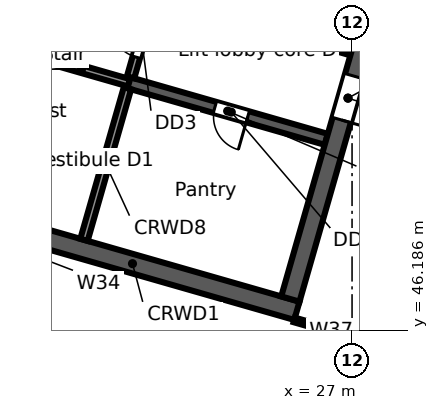
"""IFC4 building model, lengths in metres.
Left out: names, types, materials, properties, quantities, classifications, styles, units other than length and angle.
Written with IfcOpenShell. Run it as: python <this file> out.ifc"""

import sys

from ifc_helpers import new_model, si_unit, direction, frame, frame_2d, origin, place, context, subcontext, project, spatial, rectangle, extrude, element, fill, save


model = new_model("IFC4")
c1 = context("Model", 3, precision=1e-05, world=origin(), true_north=direction((0.0, 1.0)))
c2 = subcontext(c1, "Body", "Model", "MODEL_VIEW")
j1 = project(units=[si_unit("LENGTHUNIT", "METRE"), si_unit("PLANEANGLEUNIT", "RADIAN")], contexts=[c1])
p1 = place(None, origin())
s1 = spatial("IfcSite", under=j1, at=p1, CompositionType="ELEMENT")
p2 = place(p1, origin())
s2 = spatial("IfcBuilding", under=s1, at=p2, CompositionType="ELEMENT")
p3 = place(p2, frame((0.0, 0.0, 162.9)))
s3 = spatial("IfcBuildingStorey", under=s2, at=p3, CompositionType="ELEMENT", Elevation=162.9)
p4 = place(p3, frame((24.042, 41.106, 0.0), z_axis=(0.0, 0.0, 1.0), x_axis=(-0.961261693976, 0.275637362661, 0.0)))
e1 = element("IfcWall", 1, at=p4, inside=s3, PredefinedType="STANDARD", context=c2, shape_type="SweptSolid", body=[
    extrude(rectangle(XDim=24.948, YDim=0.3, at=frame_2d((12.474, 0.0))), origin(), (0.0, 0.0, 1.0), 3.68),
])
p5 = place(p4, frame((21.441, 0.0, 0.6)))
e2 = element("IfcOpeningElement", 2, at=p5, cuts=e1, PredefinedType="OPENING", context=c2, shape_type="SweptSolid", body=[
    extrude(rectangle(XDim=0.9, YDim=2.4, at=frame_2d((0.45, 1.2))), frame((0.0, 0.16, 0.0), z_axis=(0.0, -1.0, 0.0), x_axis=(1.0, 0.0, 0.0)), (0.0, 0.0, 1.0), 0.32),
])
p6 = place(p4, frame((13.121, 0.0, 0.6)))
e3 = element("IfcOpeningElement", 3, at=p6, cuts=e1, PredefinedType="OPENING", context=c2, shape_type="SweptSolid", body=[
    extrude(rectangle(XDim=0.9, YDim=2.4, at=frame_2d((0.45, 1.2))), frame((0.0, 0.16, 0.0), z_axis=(0.0, -1.0, 0.0), x_axis=(1.0, 0.0, 0.0)), (0.0, 0.0, 1.0), 0.32),
])
p7 = place(p4, frame((10.591, 0.0, 0.0)))
e4 = element("IfcOpeningElement", 4, at=p7, cuts=e1, PredefinedType="OPENING", context=c2, shape_type="SweptSolid", body=[
    extrude(rectangle(XDim=1.8, YDim=2.4, at=frame_2d((0.9, 1.2))), frame((0.0, 0.16, 0.0), z_axis=(0.0, -1.0, 0.0), x_axis=(1.0, 0.0, 0.0)), (0.0, 0.0, 1.0), 0.32),
])
p8 = place(p4, frame((4.8, 0.0, 0.6)))
e5 = element("IfcOpeningElement", 5, at=p8, cuts=e1, PredefinedType="OPENING", context=c2, shape_type="SweptSolid", body=[
    extrude(rectangle(XDim=0.9, YDim=2.4, at=frame_2d((0.45, 1.2))), frame((0.0, 0.16, 0.0), z_axis=(0.0, -1.0, 0.0), x_axis=(1.0, 0.0, 0.0)), (0.0, 0.0, 1.0), 0.32),
])
p9 = place(p4, frame((2.27, 0.0, 0.0)))
e6 = element("IfcOpeningElement", 6, at=p9, cuts=e1, PredefinedType="OPENING", context=c2, shape_type="SweptSolid", body=[
    extrude(rectangle(XDim=1.8, YDim=2.4, at=frame_2d((0.9, 1.2))), frame((0.0, 0.16, 0.0), z_axis=(0.0, -1.0, 0.0), x_axis=(1.0, 0.0, 0.0)), (0.0, 0.0, 1.0), 0.32),
])
p10 = place(p3, frame((37.399, 59.851, 0.0), z_axis=(0.0, 0.0, 1.0), x_axis=(-0.529919986982, -0.848047644532, 0.0)))
e7 = element("IfcWall", 7, at=p10, inside=s3, PredefinedType="STANDARD", context=c2, shape_type="SweptSolid", body=[
    extrude(rectangle(XDim=21.125, YDim=0.3, at=frame_2d((10.562, 0.0))), origin(), (0.0, 0.0, 1.0), 3.68),
])
p11 = place(p10, frame((16.687, 0.0, 0.6)))
e8 = element("IfcOpeningElement", 8, at=p11, cuts=e7, PredefinedType="OPENING", context=c2, shape_type="SweptSolid", body=[
    extrude(rectangle(XDim=0.9, YDim=2.4, at=frame_2d((0.45, 1.2))), frame((0.0, 0.16, 0.0), z_axis=(0.0, -1.0, 0.0), x_axis=(1.0, 0.0, 0.0)), (0.0, 0.0, 1.0), 0.32),
])
p12 = place(p10, frame((6.187, 0.0, 0.6)))
e9 = element("IfcOpeningElement", 9, at=p12, cuts=e7, PredefinedType="OPENING", context=c2, shape_type="SweptSolid", body=[
    extrude(rectangle(XDim=0.9, YDim=2.4, at=frame_2d((0.45, 1.2))), frame((0.0, 0.16, 0.0), z_axis=(0.0, -1.0, 0.0), x_axis=(1.0, 0.0, 0.0)), (0.0, 0.0, 1.0), 0.32),
])
p13 = place(p3, frame((16.897, 49.173, 0.0), z_axis=(0.0, 0.0, 1.0), x_axis=(0.96126248289, -0.275634611374, 0.0)))
e10 = element("IfcWall", 10, at=p13, inside=s3, PredefinedType="SOLIDWALL", context=c2, shape_type="SweptSolid", body=[
    extrude(rectangle(XDim=9.0, YDim=0.5, at=frame_2d((4.5, 0.0))), origin(), (0.0, 0.0, 1.0), 3.68),
])
p14 = place(p3, frame((18.632, 53.409, 0.0), z_axis=(0.0, 0.0, 1.0), x_axis=(0.961247078216, -0.275688328772, 0.0)))
e11 = element("IfcWall", 11, at=p14, inside=s3, PredefinedType="SOLIDWALL", context=c2, shape_type="SweptSolid", body=[
    extrude(rectangle(XDim=2.6, YDim=0.2, at=frame_2d((1.3, 0.0))), origin(), (0.0, 0.0, 1.0), 3.68),
])
p15 = place(p3, frame((21.131, 52.692, 0.0), z_axis=(0.0, 0.0, 1.0), x_axis=(0.961271043721, -0.27560475414, 0.0)))
e12 = element("IfcWall", 12, at=p15, inside=s3, PredefinedType="SOLIDWALL", context=c2, shape_type="SweptSolid", body=[
    extrude(rectangle(XDim=5.4, YDim=0.3, at=frame_2d((2.7, 0.0))), origin(), (0.0, 0.0, 1.0), 3.68),
])
p16 = place(p15, frame((2.35, 0.0, 0.0)))
e13 = element("IfcOpeningElement", 13, at=p16, cuts=e12, PredefinedType="OPENING", context=c2, shape_type="SweptSolid", body=[
    extrude(rectangle(XDim=0.9, YDim=2.1, at=frame_2d((0.45, 1.05))), frame((0.0, 0.16, 0.0), z_axis=(0.0, -1.0, 0.0), x_axis=(1.0, 0.0, 0.0)), (0.0, 0.0, 1.0), 0.32),
])
p17 = place(p3, frame((26.214, 53.732, 0.0), z_axis=(0.0, 0.0, 1.0), x_axis=(0.961200870072, -0.275849392554, 0.0)))
e14 = element("IfcWall", 14, at=p17, inside=s3, PredefinedType="SOLIDWALL", context=c2, shape_type="SweptSolid", body=[
    extrude(rectangle(XDim=0.8, YDim=0.2, at=frame_2d((0.4, 0.0))), origin(), (0.0, 0.0, 1.0), 3.68),
])
p18 = place(p3, frame((17.206, 49.344, 0.0), z_axis=(0.0, 0.0, 1.0), x_axis=(0.275632651182, 0.961263044958, 0.0)))
e15 = element("IfcWall", 15, at=p18, inside=s3, PredefinedType="SOLIDWALL", context=c2, shape_type="SweptSolid", body=[
    extrude(rectangle(XDim=11.0, YDim=0.5, at=frame_2d((5.5, 0.0))), origin(), (0.0, 0.0, 1.0), 3.68),
])
p19 = place(p18, frame((4.9, 0.0, 0.0)))
e16 = element("IfcOpeningElement", 16, at=p19, cuts=e15, PredefinedType="OPENING", context=c2, shape_type="SweptSolid", body=[
    extrude(rectangle(XDim=1.2, YDim=2.1, at=frame_2d((0.6, 1.05))), frame((0.0, 0.26, 0.0), z_axis=(0.0, -1.0, 0.0), x_axis=(1.0, 0.0, 0.0)), (0.0, 0.0, 1.0), 0.52),
])
p20 = place(p3, frame((19.946, 48.559, 0.0), z_axis=(0.0, 0.0, 1.0), x_axis=(0.275668905258, 0.961252648721, 0.0)))
e17 = element("IfcWall", 17, at=p20, inside=s3, PredefinedType="SOLIDWALL", context=c2, shape_type="SweptSolid", body=[
    extrude(rectangle(XDim=4.15, YDim=0.2, at=frame_2d((2.075, 0.0))), origin(), (0.0, 0.0, 1.0), 3.68),
])
p21 = place(p3, frame((21.172, 52.837, 0.0), z_axis=(0.0, 0.0, 1.0), x_axis=(0.275657676022, 0.961255868981, 0.0)))
e18 = element("IfcWall", 18, at=p21, inside=s3, PredefinedType="PARTITIONING", context=c2, shape_type="SweptSolid", body=[
    extrude(rectangle(XDim=2.1, YDim=0.2, at=frame_2d((1.05, 0.0))), origin(), (0.0, 0.0, 1.0), 3.68),
])
p22 = place(p21, frame((0.55, 0.0, 0.0)))
e19 = element("IfcOpeningElement", 19, at=p22, cuts=e18, PredefinedType="OPENING", context=c2, shape_type="SweptSolid", body=[
    extrude(rectangle(XDim=1.0, YDim=2.1, at=frame_2d((0.5, 1.05))), frame((0.0, 0.11, 0.0), z_axis=(0.0, -1.0, 0.0), x_axis=(1.0, 0.0, 0.0)), (0.0, 0.0, 1.0), 0.22),
])
p23 = place(p3, frame((25.377, 47.002, 0.0), z_axis=(0.0, 0.0, 1.0), x_axis=(0.275632651182, 0.961263044958, 0.0)))
e20 = element("IfcWall", 20, at=p23, inside=s3, PredefinedType="SOLIDWALL", context=c2, shape_type="SweptSolid", body=[
    extrude(rectangle(XDim=11.0, YDim=0.5, at=frame_2d((5.5, 0.0))), origin(), (0.0, 0.0, 1.0), 3.68),
])
p24 = place(p23, frame((4.9, 0.0, 0.0)))
e21 = element("IfcOpeningElement", 21, at=p24, cuts=e20, PredefinedType="OPENING", context=c2, shape_type="SweptSolid", body=[
    extrude(rectangle(XDim=1.2, YDim=2.1, at=frame_2d((0.6, 1.05))), frame((0.0, 0.26, 0.0), z_axis=(0.0, -1.0, 0.0), x_axis=(1.0, 0.0, 0.0)), (0.0, 0.0, 1.0), 0.52),
])
p25 = place(p3, frame((25.479, 46.452, 0.0), z_axis=(0.0, 0.0, 1.0), x_axis=(0.961245725795, -0.275693044238, 0.0)))
e22 = element("IfcWall", 22, at=p25, inside=s3, PredefinedType="PARTITIONING", context=c2, shape_type="SweptSolid", body=[
    extrude(rectangle(XDim=2.023, YDim=0.125, at=frame_2d((1.012, 0.0))), origin(), (0.0, 0.0, 1.0), 2.952),
])
p26 = place(p22, origin())
e23 = element("IfcDoor", 23, at=p26, inside=s3, OperationType="SINGLE_SWING_RIGHT", PredefinedType="DOOR", context=c2, shape_type="SweptSolid", body=[
    extrude(rectangle(XDim=1.0, YDim=2.1, at=frame_2d((0.5, 1.05))), frame((0.0, 0.025, 0.0), z_axis=(0.0, -1.0, 0.0), x_axis=(1.0, 0.0, 0.0)), (0.0, 0.0, 1.0), 0.05),
])
fill(e19, e23)
p27 = place(p24, frame((1.2, 0.0, 0.0), z_axis=(0.0, 0.0, 1.0), x_axis=(-1.0, 0.0, 0.0)))
e24 = element("IfcDoor", 24, at=p27, inside=s3, OperationType="SINGLE_SWING_RIGHT", PredefinedType="DOOR", context=c2, shape_type="SweptSolid", body=[
    extrude(rectangle(XDim=1.2, YDim=2.1, at=frame_2d((0.6, 1.05))), frame((0.0, 0.025, 0.0), z_axis=(0.0, -1.0, 0.0), x_axis=(1.0, 0.0, 0.0)), (0.0, 0.0, 1.0), 0.05),
])
fill(e21, e24)
p28 = place(p16, frame((0.9, 0.0, 0.0), z_axis=(0.0, 0.0, 1.0), x_axis=(-1.0, 0.0, 0.0)))
e25 = element("IfcDoor", 25, at=p28, inside=s3, OperationType="SINGLE_SWING_LEFT", PredefinedType="DOOR", context=c2, shape_type="SweptSolid", body=[
    extrude(rectangle(XDim=0.9, YDim=2.1, at=frame_2d((0.45, 1.05))), frame((0.0, 0.025, 0.0), z_axis=(0.0, -1.0, 0.0), x_axis=(1.0, 0.0, 0.0)), (0.0, 0.0, 1.0), 0.05),
])
fill(e13, e25)
save(model, sys.argv[1])
